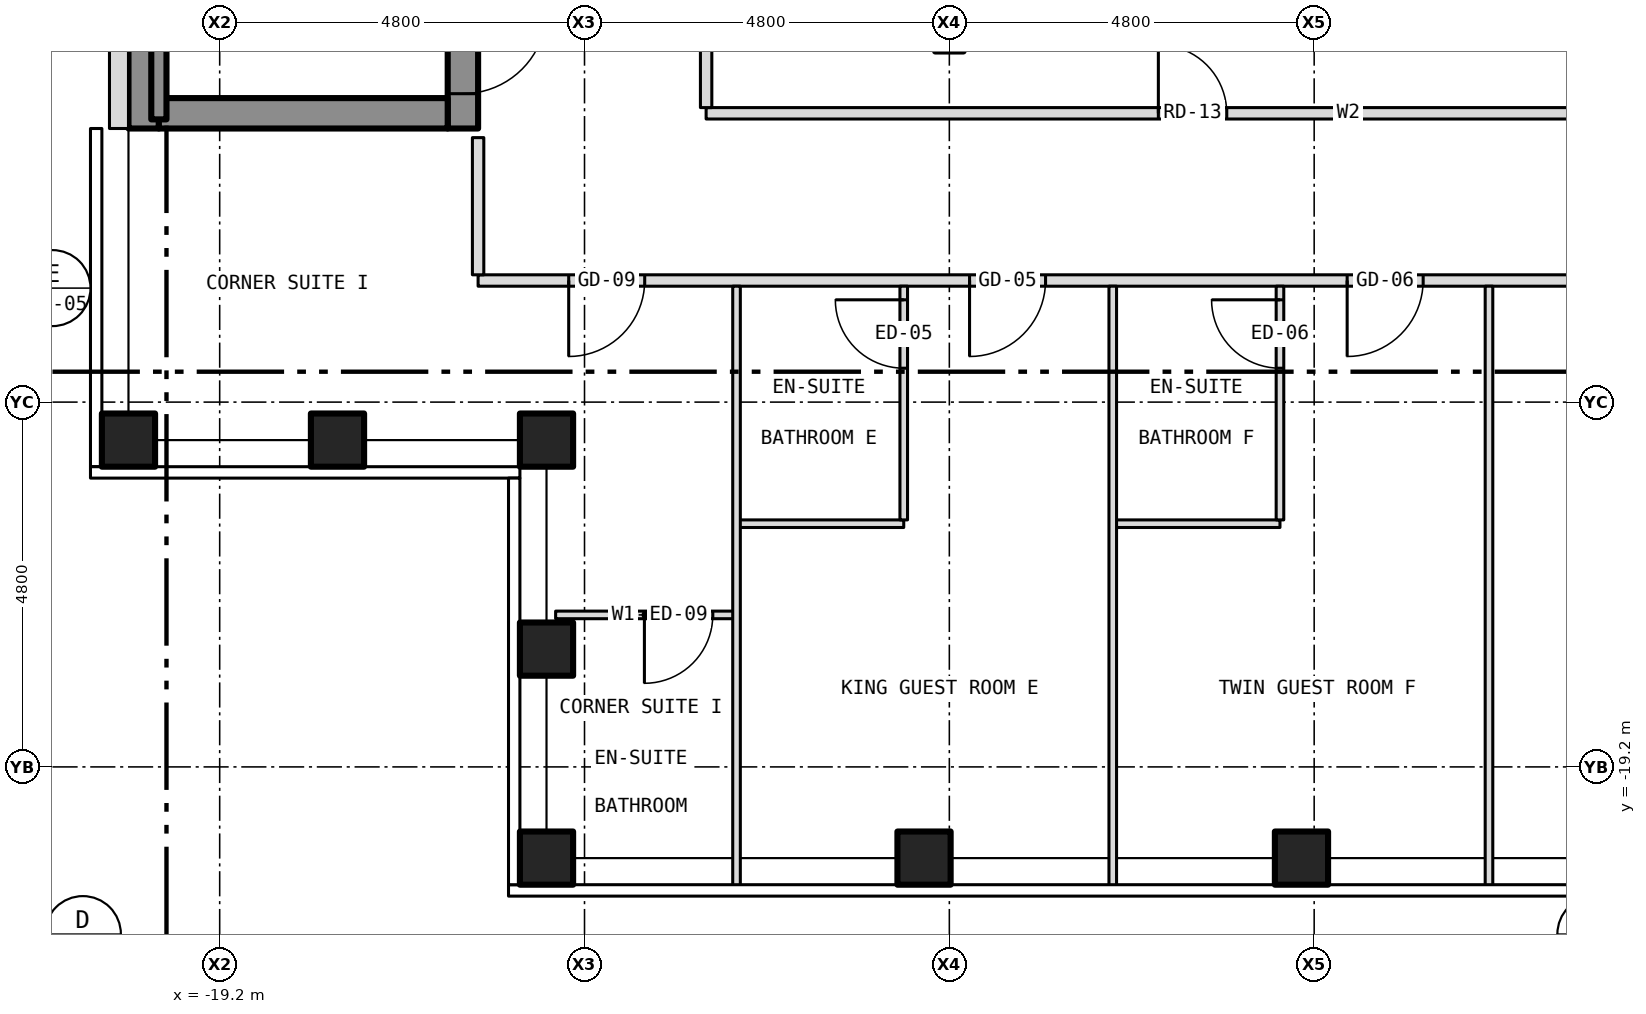
"""IFC4 building model, lengths in metres.
Left out: names, types, materials, properties, quantities, classifications, styles, units other than length and angle.
Written with IfcOpenShell. Run it as: python <this file> out.ifc"""

import sys

from ifc_helpers import new_model, si_unit, direction, frame, frame_2d, origin, origin_2d, place, context, subcontext, project, spatial, rectangle, hollow_rectangle, extrude, element, fill, save


model = new_model("IFC4")
c1 = context("Model", 3, precision=1e-05, world=origin(), true_north=direction((0.0, 1.0)))
c2 = subcontext(c1, "Body", "Model", "MODEL_VIEW")
j1 = project(units=[si_unit("LENGTHUNIT", "METRE"), si_unit("PLANEANGLEUNIT", "RADIAN")], contexts=[c1])
p1 = place(None, origin())
s1 = spatial("IfcSite", under=j1, at=p1, CompositionType="ELEMENT")
p2 = place(p1, origin())
s2 = spatial("IfcBuilding", under=s1, at=p2, CompositionType="ELEMENT")
p3 = place(p2, frame((0.0, 0.0, 198.0)))
s3 = spatial("IfcBuildingStorey", under=s2, at=p3, CompositionType="ELEMENT", Elevation=198.0)
for number, where, z_axis, x_axis in (
    (1, (-14.9, -20.4, -0.15), (0.0, 0.0, 1.0), (1.0, 0.0, 0.0)),
    (2, (-9.933, -20.4, -0.15), (0.0, 0.0, 1.0), (1.0, 0.0, 0.0)),
    (3, (-4.967, -20.4, -0.15), (0.0, 0.0, 1.0), (1.0, 0.0, 0.0)),
    (4, (-20.4, -14.9, -0.15), (0.0, 0.0, 1.0), (1.0, 0.0, 0.0)),
    (5, (-14.9, -14.9, -0.15), (0.0, 0.0, 1.0), (1.0, 0.0, 0.0)),
    (6, (-14.9, -17.65, -0.15), (0.0, 0.0, 1.0), (1.0, 0.0, 0.0)),
    (7, (-17.65, -14.9, -0.15), (0.0, 0.0, 1.0), (1.0, 0.0, 0.0)),
):
    element("IfcColumn", number, at=place(p3, frame(where, z_axis=z_axis, x_axis=x_axis)), inside=s3, PredefinedType="COLUMN", context=c2, shape_type="SweptSolid", body=[
        extrude(hollow_rectangle(XDim=0.7, YDim=0.7, WallThickness=0.04, at=origin_2d()), origin(), (0.0, 0.0, 1.0), 3.5),
    ])
p4 = place(p3, frame((-16.0, -10.8, 0.0), z_axis=(0.0, 0.0, 1.0), x_axis=(0.0, 1.0, 0.0)))
e8 = element("IfcWall", 8, at=p4, inside=s3, PredefinedType="SHEAR", context=c2, shape_type="SweptSolid", body=[
    extrude(rectangle(XDim=21.6, YDim=0.4, at=frame_2d((10.8, 0.0))), origin(), (0.0, 0.0, 1.0), 3.25),
])
p5 = place(p4, frame((9.4, 0.0, 0.0)))
e9 = element("IfcOpeningElement", 9, at=p5, cuts=e8, PredefinedType="OPENING", context=c2, shape_type="SweptSolid", body=[
    extrude(rectangle(XDim=1.1, YDim=2.1, at=frame_2d((0.55, 1.05))), frame((0.0, 0.212, 0.0), z_axis=(0.0, -1.0, 0.0), x_axis=(1.0, 0.0, 0.0)), (0.0, 0.0, 1.0), 0.424),
])
p6 = place(p4, frame((11.5, 0.0, 0.0)))
e10 = element("IfcOpeningElement", 10, at=p6, cuts=e8, PredefinedType="OPENING", context=c2, shape_type="SweptSolid", body=[
    extrude(rectangle(XDim=1.1, YDim=2.1, at=frame_2d((0.55, 1.05))), frame((0.0, 0.212, 0.0), z_axis=(0.0, -1.0, 0.0), x_axis=(1.0, 0.0, 0.0)), (0.0, 0.0, 1.0), 0.424),
])
p7 = place(p4, frame((13.6, 0.0, 0.0)))
e11 = element("IfcOpeningElement", 11, at=p7, cuts=e8, PredefinedType="OPENING", context=c2, shape_type="SweptSolid", body=[
    extrude(rectangle(XDim=1.1, YDim=2.1, at=frame_2d((0.55, 1.05))), frame((0.0, 0.212, 0.0), z_axis=(0.0, -1.0, 0.0), x_axis=(1.0, 0.0, 0.0)), (0.0, 0.0, 1.0), 0.424),
])
p8 = place(p4, frame((15.7, 0.0, 0.0)))
e12 = element("IfcOpeningElement", 12, at=p8, cuts=e8, PredefinedType="OPENING", context=c2, shape_type="SweptSolid", body=[
    extrude(rectangle(XDim=1.1, YDim=2.1, at=frame_2d((0.55, 1.05))), frame((0.0, 0.212, 0.0), z_axis=(0.0, -1.0, 0.0), x_axis=(1.0, 0.0, 0.0)), (0.0, 0.0, 1.0), 0.424),
])
p9 = place(p4, frame((17.8, 0.0, 0.0)))
e13 = element("IfcOpeningElement", 13, at=p9, cuts=e8, PredefinedType="OPENING", context=c2, shape_type="SweptSolid", body=[
    extrude(rectangle(XDim=1.1, YDim=2.1, at=frame_2d((0.55, 1.05))), frame((0.0, 0.212, 0.0), z_axis=(0.0, -1.0, 0.0), x_axis=(1.0, 0.0, 0.0)), (0.0, 0.0, 1.0), 0.424),
])
p10 = place(p4, frame((0.458, 0.0, 0.0)))
e14 = element("IfcOpeningElement", 14, at=p10, cuts=e8, PredefinedType="OPENING", context=c2, shape_type="SweptSolid", body=[
    extrude(rectangle(XDim=1.1, YDim=2.1, at=frame_2d((0.55, 1.05))), frame((0.0, 0.212, 0.0), z_axis=(0.0, -1.0, 0.0), x_axis=(1.0, 0.0, 0.0)), (0.0, 0.0, 1.0), 0.424),
])
p11 = place(p4, frame((7.5, 0.0, 0.0)))
e15 = element("IfcOpeningElement", 15, at=p11, cuts=e8, PredefinedType="OPENING", context=c2, shape_type="SweptSolid", body=[
    extrude(rectangle(XDim=1.1, YDim=2.1, at=frame_2d((0.55, 1.05))), frame((0.0, 0.212, 0.0), z_axis=(0.0, -1.0, 0.0), x_axis=(1.0, 0.0, 0.0)), (0.0, 0.0, 1.0), 0.424),
])
p12 = place(p4, frame((20.0, 0.0, 0.0)))
e16 = element("IfcOpeningElement", 16, at=p12, cuts=e8, PredefinedType="OPENING", context=c2, shape_type="SweptSolid", body=[
    extrude(rectangle(XDim=0.9, YDim=2.1, at=frame_2d((0.45, 1.05))), frame((0.0, 0.212, 0.0), z_axis=(0.0, -1.0, 0.0), x_axis=(1.0, 0.0, 0.0)), (0.0, 0.0, 1.0), 0.424),
])
p13 = place(p3, frame((-20.2, -10.8, 0.0), z_axis=(0.0, 0.0, 1.0), x_axis=(0.0, 1.0, 0.0)))
e17 = element("IfcWall", 17, at=p13, inside=s3, PredefinedType="SHEAR", context=c2, shape_type="SweptSolid", body=[
    extrude(rectangle(XDim=21.6, YDim=0.4, at=frame_2d((10.8, 0.0))), origin(), (0.0, 0.0, 1.0), 3.25),
])
p14 = place(p3, frame((-20.0, -10.6, 0.0), z_axis=(0.0, 0.0, 1.0), x_axis=(1.0, 0.0, 0.0)))
e18 = element("IfcWall", 18, at=p14, inside=s3, PredefinedType="SHEAR", context=c2, shape_type="SweptSolid", body=[
    extrude(rectangle(XDim=3.8, YDim=0.4, at=frame_2d((1.9, 0.0))), origin(), (0.0, 0.0, 1.0), 3.25),
])
p15 = place(p3, frame((-20.525, 10.8, 0.0), z_axis=(0.0, 0.0, 1.0), x_axis=(0.0, -1.0, 0.0)))
e19 = element("IfcWall", 19, at=p15, inside=s3, PredefinedType="SOLIDWALL", context=c2, shape_type="SweptSolid", body=[
    extrude(rectangle(XDim=21.6, YDim=0.25, at=frame_2d((10.8, 0.0))), origin(), (0.0, 0.0, 1.0), 3.5),
])
p16 = place(p15, frame((18.05, 0.0, 1.0)))
e20 = element("IfcOpeningElement", 20, at=p16, cuts=e19, PredefinedType="OPENING", context=c2, shape_type="SweptSolid", body=[
    extrude(rectangle(XDim=0.6, YDim=1.5, at=frame_2d((0.3, 0.75))), frame((0.0, 0.137, 0.0), z_axis=(0.0, -1.0, 0.0), x_axis=(1.0, 0.0, 0.0)), (0.0, 0.0, 1.0), 0.274),
])
p17 = place(p3, frame((-14.78, -17.2, 0.0), z_axis=(0.0, 0.0, 1.0), x_axis=(1.0, 0.0, 0.0)))
e21 = element("IfcWall", 21, at=p17, inside=s3, PredefinedType="PARTITIONING", context=c2, shape_type="SweptSolid", body=[
    extrude(rectangle(XDim=2.38, YDim=0.1, at=frame_2d((1.19, 0.0))), origin(), (0.0, 0.0, 1.0), 3.35),
])
p18 = place(p17, frame((1.168, 0.0, 0.0)))
e22 = element("IfcOpeningElement", 22, at=p18, cuts=e21, PredefinedType="OPENING", context=c2, shape_type="SweptSolid", body=[
    extrude(rectangle(XDim=0.9, YDim=2.1, at=frame_2d((0.45, 1.05))), frame((0.0, 0.062, 0.0), z_axis=(0.0, -1.0, 0.0), x_axis=(1.0, 0.0, 0.0)), (0.0, 0.0, 1.0), 0.124),
])
for number, where, z_axis, x_axis in (
    (23, (-12.4, -16.0, 0.0), (0.0, 0.0, 1.0), (1.0, 0.0, 0.0)),
    (24, (-7.45, -16.0, 0.0), (0.0, 0.0, 1.0), (1.0, 0.0, 0.0)),
):
    element("IfcWall", number, at=place(p3, frame(where, z_axis=z_axis, x_axis=x_axis)), inside=s3, PredefinedType="PARTITIONING", context=c2, shape_type="SweptSolid", body=[
        extrude(rectangle(XDim=2.2, YDim=0.1, at=frame_2d((1.1, 0.0))), origin(), (0.0, 0.0, 1.0), 3.35),
    ])
p19 = place(p3, frame((-15.8, -12.8, 0.0), z_axis=(0.0, 0.0, 1.0), x_axis=(1.0, 0.0, 0.0)))
e25 = element("IfcWall", 25, at=p19, inside=s3, PredefinedType="PARTITIONING", context=c2, shape_type="SweptSolid", body=[
    extrude(rectangle(XDim=31.6, YDim=0.15, at=frame_2d((15.8, 0.0))), origin(), (0.0, 0.0, 1.0), 3.35),
])
p20 = place(p19, frame((6.466, 0.0, 0.0)))
e26 = element("IfcOpeningElement", 26, at=p20, cuts=e25, PredefinedType="OPENING", context=c2, shape_type="SweptSolid", body=[
    extrude(rectangle(XDim=1.0, YDim=2.1, at=frame_2d((0.5, 1.05))), frame((0.0, 0.087, 0.0), z_axis=(0.0, -1.0, 0.0), x_axis=(1.0, 0.0, 0.0)), (0.0, 0.0, 1.0), 0.174),
])
p21 = place(p19, frame((11.434, 0.0, 0.0)))
e27 = element("IfcOpeningElement", 27, at=p21, cuts=e25, PredefinedType="OPENING", context=c2, shape_type="SweptSolid", body=[
    extrude(rectangle(XDim=1.0, YDim=2.1, at=frame_2d((0.5, 1.05))), frame((0.0, 0.087, 0.0), z_axis=(0.0, -1.0, 0.0), x_axis=(1.0, 0.0, 0.0)), (0.0, 0.0, 1.0), 0.174),
])
p22 = place(p19, frame((15.442, 0.0, 0.0)))
e28 = element("IfcOpeningElement", 28, at=p22, cuts=e25, PredefinedType="OPENING", context=c2, shape_type="SweptSolid", body=[
    extrude(rectangle(XDim=1.0, YDim=2.1, at=frame_2d((0.5, 1.05))), frame((0.0, 0.087, 0.0), z_axis=(0.0, -1.0, 0.0), x_axis=(1.0, 0.0, 0.0)), (0.0, 0.0, 1.0), 0.174),
])
p23 = place(p19, frame((25.092, 0.0, 0.0)))
e29 = element("IfcOpeningElement", 29, at=p23, cuts=e25, PredefinedType="OPENING", context=c2, shape_type="SweptSolid", body=[
    extrude(rectangle(XDim=1.0, YDim=2.1, at=frame_2d((0.5, 1.05))), frame((0.0, 0.087, 0.0), z_axis=(0.0, -1.0, 0.0), x_axis=(1.0, 0.0, 0.0)), (0.0, 0.0, 1.0), 0.174),
])
p24 = place(p19, frame((1.192, 0.0, 0.0)))
e30 = element("IfcOpeningElement", 30, at=p24, cuts=e25, PredefinedType="OPENING", context=c2, shape_type="SweptSolid", body=[
    extrude(rectangle(XDim=1.0, YDim=2.1, at=frame_2d((0.5, 1.05))), frame((0.0, 0.087, 0.0), z_axis=(0.0, -1.0, 0.0), x_axis=(1.0, 0.0, 0.0)), (0.0, 0.0, 1.0), 0.174),
])
p25 = place(p19, frame((29.409, 0.0, 0.0)))
e31 = element("IfcOpeningElement", 31, at=p25, cuts=e25, PredefinedType="OPENING", context=c2, shape_type="SweptSolid", body=[
    extrude(rectangle(XDim=1.0, YDim=2.1, at=frame_2d((0.5, 1.05))), frame((0.0, 0.087, 0.0), z_axis=(0.0, -1.0, 0.0), x_axis=(1.0, 0.0, 0.0)), (0.0, 0.0, 1.0), 0.174),
])
p26 = place(p3, frame((-12.8, -10.6, 0.0), z_axis=(0.0, 0.0, 1.0), x_axis=(1.0, 0.0, 0.0)))
e32 = element("IfcWall", 32, at=p26, inside=s3, PredefinedType="PARTITIONING", context=c2, shape_type="SweptSolid", body=[
    extrude(rectangle(XDim=16.9, YDim=0.15, at=frame_2d((8.45, 0.0))), origin(), (0.0, 0.0, 1.0), 3.35),
])
p27 = place(p26, frame((5.95, 0.0, 0.0)))
e33 = element("IfcOpeningElement", 33, at=p27, cuts=e32, PredefinedType="OPENING", context=c2, shape_type="SweptSolid", body=[
    extrude(rectangle(XDim=0.9, YDim=2.1, at=frame_2d((0.45, 1.05))), frame((0.0, 0.087, 0.0), z_axis=(0.0, -1.0, 0.0), x_axis=(1.0, 0.0, 0.0)), (0.0, 0.0, 1.0), 0.174),
])
p28 = place(p3, frame((-20.0, -10.68, 0.0), z_axis=(0.0, 0.0, 1.0), x_axis=(0.0, 1.0, 0.0)))
e34 = element("IfcWall", 34, at=p28, inside=s3, PredefinedType="SHEAR", context=c2, shape_type="SweptSolid", body=[
    extrude(rectangle(XDim=6.98, YDim=0.2, at=frame_2d((3.49, 0.0))), origin(), (0.0, 0.0, 1.0), 3.25),
])
p29 = place(p3, frame((-15.8, -12.725, 0.0), z_axis=(0.0, 0.0, 1.0), x_axis=(0.0, 1.0, 0.0)))
e35 = element("IfcWall", 35, at=p29, inside=s3, PredefinedType="PARTITIONING", context=c2, shape_type="SweptSolid", body=[
    extrude(rectangle(XDim=1.805, YDim=0.15, at=frame_2d((0.903, 0.0))), origin(), (0.0, 0.0, 1.0), 3.35),
])
p30 = place(p3, frame((-12.8, -10.525, 0.0), z_axis=(0.0, 0.0, 1.0), x_axis=(0.0, 1.0, 0.0)))
e36 = element("IfcWall", 36, at=p30, inside=s3, PredefinedType="PARTITIONING", context=c2, shape_type="SweptSolid", body=[
    extrude(rectangle(XDim=8.525, YDim=0.15, at=frame_2d((4.262, 0.0))), origin(), (0.0, 0.0, 1.0), 3.35),
])
p31 = place(p3, frame((-12.4, -20.78, 0.0), z_axis=(0.0, 0.0, 1.0), x_axis=(0.0, 1.0, 0.0)))
e37 = element("IfcWall", 37, at=p31, inside=s3, PredefinedType="PARTITIONING", context=c2, shape_type="SweptSolid", body=[
    extrude(rectangle(XDim=7.905, YDim=0.1, at=frame_2d((3.953, 0.0))), origin(), (0.0, 0.0, 1.0), 3.35),
])
p32 = place(p3, frame((-10.2, -15.95, 0.0), z_axis=(0.0, 0.0, 1.0), x_axis=(0.0, 1.0, 0.0)))
e38 = element("IfcWall", 38, at=p32, inside=s3, PredefinedType="PARTITIONING", context=c2, shape_type="SweptSolid", body=[
    extrude(rectangle(XDim=3.075, YDim=0.1, at=frame_2d((1.538, 0.0))), origin(), (0.0, 0.0, 1.0), 3.35),
])
p33 = place(p32, frame((1.996, 0.0, 0.0)))
e39 = element("IfcOpeningElement", 39, at=p33, cuts=e38, PredefinedType="OPENING", context=c2, shape_type="SweptSolid", body=[
    extrude(rectangle(XDim=0.9, YDim=2.1, at=frame_2d((0.45, 1.05))), frame((0.0, 0.062, 0.0), z_axis=(0.0, -1.0, 0.0), x_axis=(1.0, 0.0, 0.0)), (0.0, 0.0, 1.0), 0.124),
])
p34 = place(p3, frame((-7.45, -20.78, 0.0), z_axis=(0.0, 0.0, 1.0), x_axis=(0.0, 1.0, 0.0)))
e40 = element("IfcWall", 40, at=p34, inside=s3, PredefinedType="PARTITIONING", context=c2, shape_type="SweptSolid", body=[
    extrude(rectangle(XDim=7.905, YDim=0.1, at=frame_2d((3.953, 0.0))), origin(), (0.0, 0.0, 1.0), 3.35),
])
p35 = place(p3, frame((-5.25, -15.95, 0.0), z_axis=(0.0, 0.0, 1.0), x_axis=(0.0, 1.0, 0.0)))
e41 = element("IfcWall", 41, at=p35, inside=s3, PredefinedType="PARTITIONING", context=c2, shape_type="SweptSolid", body=[
    extrude(rectangle(XDim=3.075, YDim=0.1, at=frame_2d((1.538, 0.0))), origin(), (0.0, 0.0, 1.0), 3.35),
])
p36 = place(p35, frame((1.996, 0.0, 0.0)))
e42 = element("IfcOpeningElement", 42, at=p36, cuts=e41, PredefinedType="OPENING", context=c2, shape_type="SweptSolid", body=[
    extrude(rectangle(XDim=0.9, YDim=2.1, at=frame_2d((0.45, 1.05))), frame((0.0, 0.062, 0.0), z_axis=(0.0, -1.0, 0.0), x_axis=(1.0, 0.0, 0.0)), (0.0, 0.0, 1.0), 0.124),
])
p37 = place(p3, frame((-2.5, -20.78, 0.0), z_axis=(0.0, 0.0, 1.0), x_axis=(0.0, 1.0, 0.0)))
e43 = element("IfcWall", 43, at=p37, inside=s3, PredefinedType="PARTITIONING", context=c2, shape_type="SweptSolid", body=[
    extrude(rectangle(XDim=7.905, YDim=0.1, at=frame_2d((3.953, 0.0))), origin(), (0.0, 0.0, 1.0), 3.35),
])
p38 = place(p10, origin())
e44 = element("IfcDoor", 44, at=p38, inside=s3, OperationType="SINGLE_SWING_RIGHT", PredefinedType="DOOR", context=c2, shape_type="SweptSolid", body=[
    extrude(rectangle(XDim=1.1, YDim=2.1, at=frame_2d((0.55, 1.05))), frame((0.0, 0.025, 0.0), z_axis=(0.0, -1.0, 0.0), x_axis=(1.0, 0.0, 0.0)), (0.0, 0.0, 1.0), 0.05),
])
fill(e14, e44)
p39 = place(p20, origin())
e45 = element("IfcDoor", 45, at=p39, inside=s3, OperationType="SINGLE_SWING_LEFT", PredefinedType="DOOR", context=c2, shape_type="SweptSolid", body=[
    extrude(rectangle(XDim=1.0, YDim=2.1, at=frame_2d((0.5, 1.05))), frame((0.0, 0.025, 0.0), z_axis=(0.0, -1.0, 0.0), x_axis=(1.0, 0.0, 0.0)), (0.0, 0.0, 1.0), 0.05),
])
fill(e26, e45)
p40 = place(p33, origin())
e46 = element("IfcDoor", 46, at=p40, inside=s3, OperationType="SINGLE_SWING_RIGHT", PredefinedType="DOOR", context=c2, shape_type="SweptSolid", body=[
    extrude(rectangle(XDim=0.9, YDim=2.1, at=frame_2d((0.45, 1.05))), frame((0.0, 0.025, 0.0), z_axis=(0.0, -1.0, 0.0), x_axis=(1.0, 0.0, 0.0)), (0.0, 0.0, 1.0), 0.05),
])
fill(e39, e46)
p41 = place(p21, origin())
e47 = element("IfcDoor", 47, at=p41, inside=s3, OperationType="SINGLE_SWING_LEFT", PredefinedType="DOOR", context=c2, shape_type="SweptSolid", body=[
    extrude(rectangle(XDim=1.0, YDim=2.1, at=frame_2d((0.5, 1.05))), frame((0.0, 0.025, 0.0), z_axis=(0.0, -1.0, 0.0), x_axis=(1.0, 0.0, 0.0)), (0.0, 0.0, 1.0), 0.05),
])
fill(e27, e47)
p42 = place(p36, origin())
e48 = element("IfcDoor", 48, at=p42, inside=s3, OperationType="SINGLE_SWING_RIGHT", PredefinedType="DOOR", context=c2, shape_type="SweptSolid", body=[
    extrude(rectangle(XDim=0.9, YDim=2.1, at=frame_2d((0.45, 1.05))), frame((0.0, 0.025, 0.0), z_axis=(0.0, -1.0, 0.0), x_axis=(1.0, 0.0, 0.0)), (0.0, 0.0, 1.0), 0.05),
])
fill(e42, e48)
p43 = place(p18, origin())
e49 = element("IfcDoor", 49, at=p43, inside=s3, OperationType="SINGLE_SWING_LEFT", PredefinedType="DOOR", context=c2, shape_type="SweptSolid", body=[
    extrude(rectangle(XDim=0.9, YDim=2.1, at=frame_2d((0.45, 1.05))), frame((0.0, 0.025, 0.0), z_axis=(0.0, -1.0, 0.0), x_axis=(1.0, 0.0, 0.0)), (0.0, 0.0, 1.0), 0.05),
])
fill(e22, e49)
p44 = place(p24, origin())
e50 = element("IfcDoor", 50, at=p44, inside=s3, OperationType="SINGLE_SWING_LEFT", PredefinedType="DOOR", context=c2, shape_type="SweptSolid", body=[
    extrude(rectangle(XDim=1.0, YDim=2.1, at=frame_2d((0.5, 1.05))), frame((0.0, 0.025, 0.0), z_axis=(0.0, -1.0, 0.0), x_axis=(1.0, 0.0, 0.0)), (0.0, 0.0, 1.0), 0.05),
])
fill(e30, e50)
p45 = place(p27, origin())
e51 = element("IfcDoor", 51, at=p45, inside=s3, OperationType="SINGLE_SWING_LEFT", PredefinedType="DOOR", context=c2, shape_type="SweptSolid", body=[
    extrude(rectangle(XDim=0.9, YDim=2.1, at=frame_2d((0.45, 1.05))), frame((0.0, 0.025, 0.0), z_axis=(0.0, -1.0, 0.0), x_axis=(1.0, 0.0, 0.0)), (0.0, 0.0, 1.0), 0.05),
])
fill(e33, e51)
save(model, sys.argv[1])
